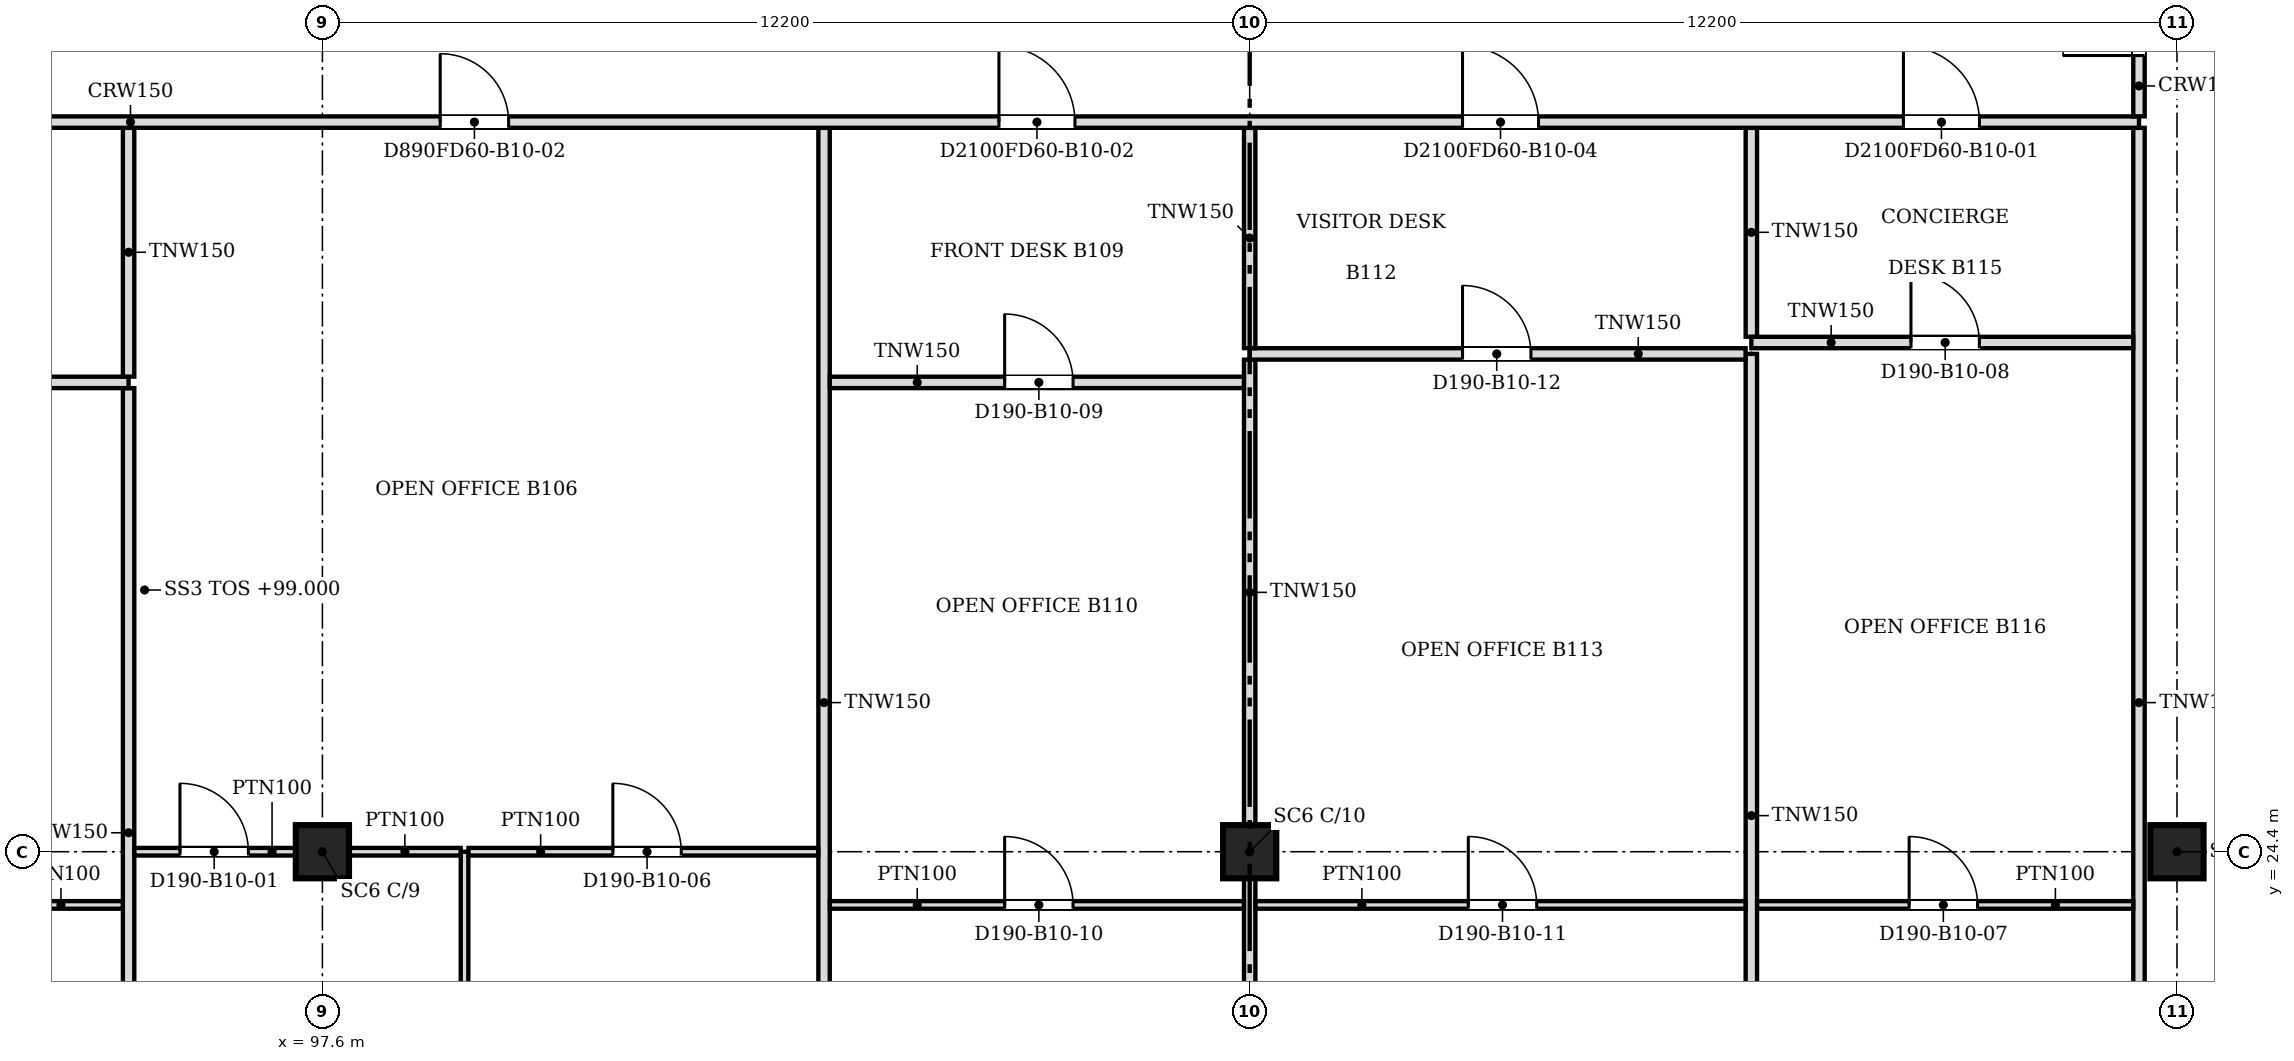
"""IFC4 building model, lengths in metres.
Left out: names, types, materials, properties, quantities, classifications, styles, units other than length and angle.
Written with IfcOpenShell. Run it as: python <this file> out.ifc"""

import sys

from ifc_helpers import new_model, si_unit, direction, frame, frame_2d, origin, origin_2d, place, context, subcontext, project, spatial, rectangle, extrude, source, transform, mapped, element, fill, save


model = new_model("IFC4")
c1 = context("Model", 3, precision=1e-05, world=origin(), true_north=direction((0.0, 1.0)))
c2 = subcontext(c1, "Body", "Model", "MODEL_VIEW")
j1 = project(units=[si_unit("LENGTHUNIT", "METRE"), si_unit("PLANEANGLEUNIT", "RADIAN")], contexts=[c1])
p1 = place(None, origin())
s1 = spatial("IfcSite", under=j1, at=p1, CompositionType="ELEMENT")
p2 = place(p1, origin())
s2 = spatial("IfcBuilding", under=s1, at=p2, CompositionType="ELEMENT")
p3 = place(p2, frame((0.0, 0.0, 99.0)))
s3 = spatial("IfcBuildingStorey", under=s2, at=p3, CompositionType="ELEMENT", Elevation=99.0)
for number, where, z_axis, x_axis in (
    (1, (97.6, 24.4, 0.0), (0.0, 0.0, 1.0), (1.0, 0.0, 0.0)),
    (2, (109.8, 24.4, 0.0), (0.0, 0.0, 1.0), (1.0, 0.0, 0.0)),
    (3, (122.0, 24.4, 0.0), (0.0, 0.0, 1.0), (1.0, 0.0, 0.0)),
):
    element("IfcColumn", number, at=place(p3, frame(where, z_axis=z_axis, x_axis=x_axis)), inside=s3, PredefinedType="COLUMN", context=c2, shape_type="SweptSolid", body=[
        extrude(rectangle(XDim=0.7, YDim=0.7, at=origin_2d()), origin(), (0.0, 0.0, 1.0), 3.6),
    ])
p4 = place(p3, frame((95.05, 18.8, 0.0), z_axis=(0.0, 0.0, 1.0), x_axis=(0.0, 1.0, 0.0)))
e4 = element("IfcWall", 4, at=p4, inside=s3, PredefinedType="PARTITIONING", context=c2, shape_type="SweptSolid", body=[
    extrude(rectangle(XDim=11.699, YDim=0.15, at=frame_2d((5.85, 0.0))), origin(), (0.0, 0.0, 1.0), 3.067),
])
p5 = place(p3, frame((99.47, 18.8, 0.0), z_axis=(0.0, 0.0, 1.0), x_axis=(0.0, 1.0, 0.0)))
e5 = element("IfcWall", 5, at=p5, inside=s3, PredefinedType="PARTITIONING", context=c2, shape_type="SweptSolid", body=[
    extrude(rectangle(XDim=5.6, YDim=0.1, at=frame_2d((2.8, 0.0))), origin(), (0.0, 0.0, 1.0), 3.067),
])
p6 = place(p3, frame((104.2, 18.8, 0.0), z_axis=(0.0, 0.0, 1.0), x_axis=(0.0, 1.0, 0.0)))
e6 = element("IfcWall", 6, at=p6, inside=s3, PredefinedType="PARTITIONING", context=c2, shape_type="SweptSolid", body=[
    extrude(rectangle(XDim=15.124, YDim=0.15, at=frame_2d((7.562, 0.0))), origin(), (0.0, 0.0, 1.0), 3.067),
])
p7 = place(p3, frame((109.8, 18.8, 0.0), z_axis=(0.0, 0.0, 1.0), x_axis=(0.0, 1.0, 0.0)))
e7 = element("IfcWall", 7, at=p7, inside=s3, PredefinedType="PARTITIONING", context=c2, shape_type="SweptSolid", body=[
    extrude(rectangle(XDim=5.249, YDim=0.15, at=frame_2d((2.625, 0.0))), origin(), (0.0, 0.0, 1.0), 3.067),
])
p8 = place(p3, frame((116.4, 18.8, 0.0), z_axis=(0.0, 0.0, 1.0), x_axis=(0.0, 1.0, 0.0)))
e8 = element("IfcWall", 8, at=p8, inside=s3, PredefinedType="PARTITIONING", context=c2, shape_type="SweptSolid", body=[
    extrude(rectangle(XDim=12.15, YDim=0.15, at=frame_2d((6.075, 0.0))), origin(), (0.0, 0.0, 1.0), 3.067),
])
p9 = place(p3, frame((121.5, 18.8, 0.0), z_axis=(0.0, 0.0, 1.0), x_axis=(0.0, 1.0, 0.0)))
e9 = element("IfcWall", 9, at=p9, inside=s3, PredefinedType="PARTITIONING", context=c2, shape_type="SweptSolid", body=[
    extrude(rectangle(XDim=15.124, YDim=0.15, at=frame_2d((7.562, 0.0))), origin(), (0.0, 0.0, 1.0), 3.067),
])
p10 = place(p3, frame((94.974, 23.7, 0.0), z_axis=(0.0, 0.0, 1.0), x_axis=(-1.0, 0.0, 0.0)))
e10 = element("IfcWall", 10, at=p10, inside=s3, PredefinedType="PARTITIONING", context=c2, shape_type="SweptSolid", body=[
    extrude(rectangle(XDim=4.128, YDim=0.1, at=frame_2d((2.064, 0.0))), origin(), (0.0, 0.0, 1.0), 3.067),
])
m1 = source(origin(), c2, "Body", "SweptSolid", [
    extrude(rectangle(XDim=0.9, YDim=2.1, at=frame_2d((0.45, 1.05))), frame((0.0, 0.06, 0.0), z_axis=(0.0, -1.0, 0.0), x_axis=(1.0, 0.0, 0.0)), (0.0, 0.0, 1.0), 0.12),
])
p11 = place(p10, frame((1.628, 0.0, 0.0)))
e11 = element("IfcOpeningElement", 11, at=p11, cuts=e10, PredefinedType="OPENING", context=c2, shape_type="MappedRepresentation", body=[
    mapped(m1, transform((0.0, 0.0, 0.0), scale=1.0)),
])
p12 = place(p3, frame((109.724, 23.7, 0.0), z_axis=(0.0, 0.0, 1.0), x_axis=(-1.0, 0.0, 0.0)))
e12 = element("IfcWall", 12, at=p12, inside=s3, PredefinedType="PARTITIONING", context=c2, shape_type="SweptSolid", body=[
    extrude(rectangle(XDim=5.448, YDim=0.1, at=frame_2d((2.724, 0.0))), origin(), (0.0, 0.0, 1.0), 3.067),
])
p13 = place(p12, frame((2.248, 0.0, 0.0)))
e13 = element("IfcOpeningElement", 13, at=p13, cuts=e12, PredefinedType="OPENING", context=c2, shape_type="MappedRepresentation", body=[
    mapped(m1, transform((0.0, 0.0, 0.0), scale=1.0)),
])
p14 = place(p3, frame((116.324, 23.7, 0.0), z_axis=(0.0, 0.0, 1.0), x_axis=(-1.0, 0.0, 0.0)))
e14 = element("IfcWall", 14, at=p14, inside=s3, PredefinedType="PARTITIONING", context=c2, shape_type="SweptSolid", body=[
    extrude(rectangle(XDim=6.448, YDim=0.1, at=frame_2d((3.224, 0.0))), origin(), (0.0, 0.0, 1.0), 3.067),
])
p15 = place(p14, frame((2.748, 0.0, 0.0)))
e15 = element("IfcOpeningElement", 15, at=p15, cuts=e14, PredefinedType="OPENING", context=c2, shape_type="MappedRepresentation", body=[
    mapped(m1, transform((0.0, 0.0, 0.0), scale=1.0)),
])
p16 = place(p3, frame((121.424, 23.7, 0.0), z_axis=(0.0, 0.0, 1.0), x_axis=(-1.0, 0.0, 0.0)))
e16 = element("IfcWall", 16, at=p16, inside=s3, PredefinedType="PARTITIONING", context=c2, shape_type="SweptSolid", body=[
    extrude(rectangle(XDim=4.948, YDim=0.1, at=frame_2d((2.474, 0.0))), origin(), (0.0, 0.0, 1.0), 3.067),
])
p17 = place(p16, frame((2.048, 0.0, 0.0)))
e17 = element("IfcOpeningElement", 17, at=p17, cuts=e16, PredefinedType="OPENING", context=c2, shape_type="MappedRepresentation", body=[
    mapped(m1, transform((0.0, 0.0, 0.0), scale=1.0)),
])
p18 = place(p3, frame((97.249, 24.4, 0.0), z_axis=(0.0, 0.0, 1.0), x_axis=(-1.0, 0.0, 0.0)))
e18 = element("IfcWall", 18, at=p18, inside=s3, PredefinedType="PARTITIONING", context=c2, shape_type="SweptSolid", body=[
    extrude(rectangle(XDim=2.123, YDim=0.1, at=frame_2d((1.062, 0.0))), origin(), (0.0, 0.0, 1.0), 3.067),
])
p19 = place(p18, frame((0.623, 0.0, 0.0)))
e19 = element("IfcOpeningElement", 19, at=p19, cuts=e18, PredefinedType="OPENING", context=c2, shape_type="MappedRepresentation", body=[
    mapped(m1, transform((0.0, 0.0, 0.0), scale=1.0)),
])
p20 = place(p3, frame((97.951, 24.4, 0.0), z_axis=(0.0, 0.0, 1.0), x_axis=(1.0, 0.0, 0.0)))
e20 = element("IfcWall", 20, at=p20, inside=s3, PredefinedType="PARTITIONING", context=c2, shape_type="SweptSolid", body=[
    extrude(rectangle(XDim=1.468, YDim=0.1, at=frame_2d((0.734, 0.0))), origin(), (0.0, 0.0, 1.0), 3.067),
])
p21 = place(p3, frame((104.124, 24.4, 0.0), z_axis=(0.0, 0.0, 1.0), x_axis=(-1.0, 0.0, 0.0)))
e21 = element("IfcWall", 21, at=p21, inside=s3, PredefinedType="PARTITIONING", context=c2, shape_type="SweptSolid", body=[
    extrude(rectangle(XDim=4.603, YDim=0.1, at=frame_2d((2.301, 0.0))), origin(), (0.0, 0.0, 1.0), 3.067),
])
p22 = place(p21, frame((1.803, 0.0, 0.0)))
e22 = element("IfcOpeningElement", 22, at=p22, cuts=e21, PredefinedType="OPENING", context=c2, shape_type="MappedRepresentation", body=[
    mapped(m1, transform((0.0, 0.0, 0.0), scale=1.0)),
])
p23 = place(p3, frame((109.8, 24.751, 0.0), z_axis=(0.0, 0.0, 1.0), x_axis=(0.0, 1.0, 0.0)))
e23 = element("IfcWall", 23, at=p23, inside=s3, PredefinedType="PARTITIONING", context=c2, shape_type="SweptSolid", body=[
    extrude(rectangle(XDim=6.123, YDim=0.15, at=frame_2d((3.062, 0.0))), origin(), (0.0, 0.0, 1.0), 3.067),
])
p24 = place(p3, frame((95.05, 30.575, 0.0), z_axis=(0.0, 0.0, 1.0), x_axis=(-1.0, 0.0, 0.0)))
e24 = element("IfcWall", 24, at=p24, inside=s3, PredefinedType="PARTITIONING", context=c2, shape_type="SweptSolid", body=[
    extrude(rectangle(XDim=9.15, YDim=0.15, at=frame_2d((4.575, 0.0))), origin(), (0.0, 0.0, 1.0), 3.067),
])
m2 = source(origin(), c2, "Body", "SweptSolid", [
    extrude(rectangle(XDim=0.9, YDim=2.1, at=frame_2d((0.45, 1.05))), frame((0.0, 0.085, 0.0), z_axis=(0.0, -1.0, 0.0), x_axis=(1.0, 0.0, 0.0)), (0.0, 0.0, 1.0), 0.17),
])
p25 = place(p24, frame((4.15, 0.0, 0.0)))
e25 = element("IfcOpeningElement", 25, at=p25, cuts=e24, PredefinedType="OPENING", context=c2, shape_type="MappedRepresentation", body=[
    mapped(m2, transform((0.0, 0.0, 0.0), scale=1.0)),
])
p26 = place(p3, frame((109.724, 30.575, 0.0), z_axis=(0.0, 0.0, 1.0), x_axis=(-1.0, 0.0, 0.0)))
e26 = element("IfcWall", 26, at=p26, inside=s3, PredefinedType="PARTITIONING", context=c2, shape_type="SweptSolid", body=[
    extrude(rectangle(XDim=5.448, YDim=0.15, at=frame_2d((2.724, 0.0))), origin(), (0.0, 0.0, 1.0), 3.067),
])
p27 = place(p26, frame((2.248, 0.0, 0.0)))
e27 = element("IfcOpeningElement", 27, at=p27, cuts=e26, PredefinedType="OPENING", context=c2, shape_type="MappedRepresentation", body=[
    mapped(m2, transform((0.0, 0.0, 0.0), scale=1.0)),
])
p28 = place(p3, frame((95.05, 30.651, 0.0), z_axis=(0.0, 0.0, 1.0), x_axis=(0.0, 1.0, 0.0)))
e28 = element("IfcWall", 28, at=p28, inside=s3, PredefinedType="PARTITIONING", context=c2, shape_type="SweptSolid", body=[
    extrude(rectangle(XDim=3.273, YDim=0.15, at=frame_2d((1.637, 0.0))), origin(), (0.0, 0.0, 1.0), 3.067),
])
p29 = place(p3, frame((116.324, 30.95, 0.0), z_axis=(0.0, 0.0, 1.0), x_axis=(-1.0, 0.0, 0.0)))
e29 = element("IfcWall", 29, at=p29, inside=s3, PredefinedType="PARTITIONING", context=c2, shape_type="SweptSolid", body=[
    extrude(rectangle(XDim=6.524, YDim=0.15, at=frame_2d((3.262, 0.0))), origin(), (0.0, 0.0, 1.0), 3.067),
])
p30 = place(p29, frame((2.824, 0.0, 0.0)))
e30 = element("IfcOpeningElement", 30, at=p30, cuts=e29, PredefinedType="OPENING", context=c2, shape_type="MappedRepresentation", body=[
    mapped(m2, transform((0.0, 0.0, 0.0), scale=1.0)),
])
p31 = place(p3, frame((109.8, 31.026, 0.0), z_axis=(0.0, 0.0, 1.0), x_axis=(0.0, 1.0, 0.0)))
e31 = element("IfcWall", 31, at=p31, inside=s3, PredefinedType="PARTITIONING", context=c2, shape_type="SweptSolid", body=[
    extrude(rectangle(XDim=2.898, YDim=0.15, at=frame_2d((1.449, 0.0))), origin(), (0.0, 0.0, 1.0), 3.067),
])
p32 = place(p3, frame((121.424, 31.1, 0.0), z_axis=(0.0, 0.0, 1.0), x_axis=(-1.0, 0.0, 0.0)))
e32 = element("IfcWall", 32, at=p32, inside=s3, PredefinedType="PARTITIONING", context=c2, shape_type="SweptSolid", body=[
    extrude(rectangle(XDim=5.024, YDim=0.15, at=frame_2d((2.512, 0.0))), origin(), (0.0, 0.0, 1.0), 3.067),
])
p33 = place(p32, frame((2.024, 0.0, 0.0)))
e33 = element("IfcOpeningElement", 33, at=p33, cuts=e32, PredefinedType="OPENING", context=c2, shape_type="MappedRepresentation", body=[
    mapped(m2, transform((0.0, 0.0, 0.0), scale=1.0)),
])
p34 = place(p3, frame((116.4, 31.176, 0.0), z_axis=(0.0, 0.0, 1.0), x_axis=(0.0, 1.0, 0.0)))
e34 = element("IfcWall", 34, at=p34, inside=s3, PredefinedType="PARTITIONING", context=c2, shape_type="SweptSolid", body=[
    extrude(rectangle(XDim=2.748, YDim=0.15, at=frame_2d((1.374, 0.0))), origin(), (0.0, 0.0, 1.0), 3.067),
])
p35 = place(p3, frame((121.5, 34.0, 0.0), z_axis=(0.0, 0.0, 1.0), x_axis=(-1.0, 0.0, 0.0)))
e35 = element("IfcWall", 35, at=p35, inside=s3, PredefinedType="PARTITIONING", context=c2, shape_type="SweptSolid", body=[
    extrude(rectangle(XDim=35.6, YDim=0.15, at=frame_2d((17.8, 0.0))), origin(), (0.0, 0.0, 1.0), 3.067),
])
m3 = source(origin(), c2, "Body", "SweptSolid", [
    extrude(rectangle(XDim=1.0, YDim=2.1, at=frame_2d((0.5, 1.05))), frame((0.0, 0.085, 0.0), z_axis=(0.0, -1.0, 0.0), x_axis=(1.0, 0.0, 0.0)), (0.0, 0.0, 1.0), 0.17),
])
p36 = place(p35, frame((2.099, 0.0, 0.0)))
e36 = element("IfcOpeningElement", 36, at=p36, cuts=e35, PredefinedType="OPENING", context=c2, shape_type="MappedRepresentation", body=[
    mapped(m3, transform((0.0, 0.0, 0.0), scale=1.0)),
])
p37 = place(p35, frame((13.999, 0.0, 0.0)))
e37 = element("IfcOpeningElement", 37, at=p37, cuts=e35, PredefinedType="OPENING", context=c2, shape_type="MappedRepresentation", body=[
    mapped(m3, transform((0.0, 0.0, 0.0), scale=1.0)),
])
p38 = place(p35, frame((7.9, 0.0, 0.0)))
e38 = element("IfcOpeningElement", 38, at=p38, cuts=e35, PredefinedType="OPENING", context=c2, shape_type="MappedRepresentation", body=[
    mapped(m3, transform((0.0, 0.0, 0.0), scale=1.0)),
])
p39 = place(p35, frame((30.5, 0.0, 0.0)))
e39 = element("IfcOpeningElement", 39, at=p39, cuts=e35, PredefinedType="OPENING", context=c2, shape_type="MappedRepresentation", body=[
    mapped(m3, transform((0.0, 0.0, 0.0), scale=1.0)),
])
p40 = place(p35, frame((21.45, 0.0, 0.0)))
e40 = element("IfcOpeningElement", 40, at=p40, cuts=e35, PredefinedType="OPENING", context=c2, shape_type="MappedRepresentation", body=[
    mapped(m2, transform((0.0, 0.0, 0.0), scale=1.0)),
])
p41 = place(p3, frame((121.5, 36.6, 0.0), z_axis=(0.0, 0.0, 1.0), x_axis=(0.0, -1.0, 0.0)))
e41 = element("IfcWall", 41, at=p41, inside=s3, PredefinedType="PARTITIONING", context=c2, shape_type="SweptSolid", body=[
    extrude(rectangle(XDim=2.524, YDim=0.15, at=frame_2d((1.262, 0.0))), origin(), (0.0, 0.0, 1.0), 3.067),
])
p42 = place(p41, frame((0.724, 0.0, 0.0)))
e42 = element("IfcOpeningElement", 42, at=p42, cuts=e41, PredefinedType="OPENING", context=c2, shape_type="MappedRepresentation", body=[
    mapped(m3, transform((0.0, 0.0, 0.0), scale=1.0)),
])
m4 = source(origin(), c2, "Body", "SweptSolid", [
    extrude(rectangle(XDim=0.9, YDim=2.1, at=frame_2d((0.45, 1.05))), frame((0.0, 0.025, 0.0), z_axis=(0.0, -1.0, 0.0), x_axis=(1.0, 0.0, 0.0)), (0.0, 0.0, 1.0), 0.05),
])
p43 = place(p19, origin())
e43 = element("IfcDoor", 43, at=p43, inside=s3, OperationType="SINGLE_SWING_RIGHT", PredefinedType="DOOR", context=c2, shape_type="MappedRepresentation", body=[
    mapped(m4, transform((0.0, 0.0, 0.0), scale=1.0)),
])
fill(e19, e43)
p44 = place(p22, origin())
e44 = element("IfcDoor", 44, at=p44, inside=s3, OperationType="SINGLE_SWING_RIGHT", PredefinedType="DOOR", context=c2, shape_type="MappedRepresentation", body=[
    mapped(m4, transform((0.0, 0.0, 0.0), scale=1.0)),
])
fill(e22, e44)
p45 = place(p17, origin())
e45 = element("IfcDoor", 45, at=p45, inside=s3, OperationType="SINGLE_SWING_RIGHT", PredefinedType="DOOR", context=c2, shape_type="MappedRepresentation", body=[
    mapped(m4, transform((0.0, 0.0, 0.0), scale=1.0)),
])
fill(e17, e45)
p46 = place(p33, origin())
e46 = element("IfcDoor", 46, at=p46, inside=s3, OperationType="SINGLE_SWING_RIGHT", PredefinedType="DOOR", context=c2, shape_type="MappedRepresentation", body=[
    mapped(m4, transform((0.0, 0.0, 0.0), scale=1.0)),
])
fill(e33, e46)
m5 = source(origin(), c2, "Body", "SweptSolid", [
    extrude(rectangle(XDim=1.0, YDim=2.1, at=frame_2d((0.5, 1.05))), frame((0.0, 0.025, 0.0), z_axis=(0.0, -1.0, 0.0), x_axis=(1.0, 0.0, 0.0)), (0.0, 0.0, 1.0), 0.05),
])
p47 = place(p36, origin())
e47 = element("IfcDoor", 47, at=p47, inside=s3, OperationType="SINGLE_SWING_RIGHT", PredefinedType="DOOR", context=c2, shape_type="MappedRepresentation", body=[
    mapped(m5, transform((0.0, 0.0, 0.0), scale=1.0)),
])
fill(e36, e47)
p48 = place(p27, origin())
e48 = element("IfcDoor", 48, at=p48, inside=s3, OperationType="SINGLE_SWING_RIGHT", PredefinedType="DOOR", context=c2, shape_type="MappedRepresentation", body=[
    mapped(m4, transform((0.0, 0.0, 0.0), scale=1.0)),
])
fill(e27, e48)
p49 = place(p13, origin())
e49 = element("IfcDoor", 49, at=p49, inside=s3, OperationType="SINGLE_SWING_RIGHT", PredefinedType="DOOR", context=c2, shape_type="MappedRepresentation", body=[
    mapped(m4, transform((0.0, 0.0, 0.0), scale=1.0)),
])
fill(e13, e49)
p50 = place(p37, origin())
e50 = element("IfcDoor", 50, at=p50, inside=s3, OperationType="SINGLE_SWING_RIGHT", PredefinedType="DOOR", context=c2, shape_type="MappedRepresentation", body=[
    mapped(m5, transform((0.0, 0.0, 0.0), scale=1.0)),
])
fill(e37, e50)
p51 = place(p15, origin())
e51 = element("IfcDoor", 51, at=p51, inside=s3, OperationType="SINGLE_SWING_RIGHT", PredefinedType="DOOR", context=c2, shape_type="MappedRepresentation", body=[
    mapped(m4, transform((0.0, 0.0, 0.0), scale=1.0)),
])
fill(e15, e51)
p52 = place(p30, origin())
e52 = element("IfcDoor", 52, at=p52, inside=s3, OperationType="SINGLE_SWING_RIGHT", PredefinedType="DOOR", context=c2, shape_type="MappedRepresentation", body=[
    mapped(m4, transform((0.0, 0.0, 0.0), scale=1.0)),
])
fill(e30, e52)
p53 = place(p38, origin())
e53 = element("IfcDoor", 53, at=p53, inside=s3, OperationType="SINGLE_SWING_RIGHT", PredefinedType="DOOR", context=c2, shape_type="MappedRepresentation", body=[
    mapped(m5, transform((0.0, 0.0, 0.0), scale=1.0)),
])
fill(e38, e53)
p54 = place(p40, origin())
e54 = element("IfcDoor", 54, at=p54, inside=s3, OperationType="SINGLE_SWING_RIGHT", PredefinedType="DOOR", context=c2, shape_type="MappedRepresentation", body=[
    mapped(m4, transform((0.0, 0.0, 0.0), scale=1.0)),
])
fill(e40, e54)
p55 = place(p42, origin())
e55 = element("IfcDoor", 55, at=p55, inside=s3, OperationType="SINGLE_SWING_RIGHT", PredefinedType="DOOR", context=c2, shape_type="MappedRepresentation", body=[
    mapped(m5, transform((0.0, 0.0, 0.0), scale=1.0)),
])
fill(e42, e55)
save(model, sys.argv[1])
